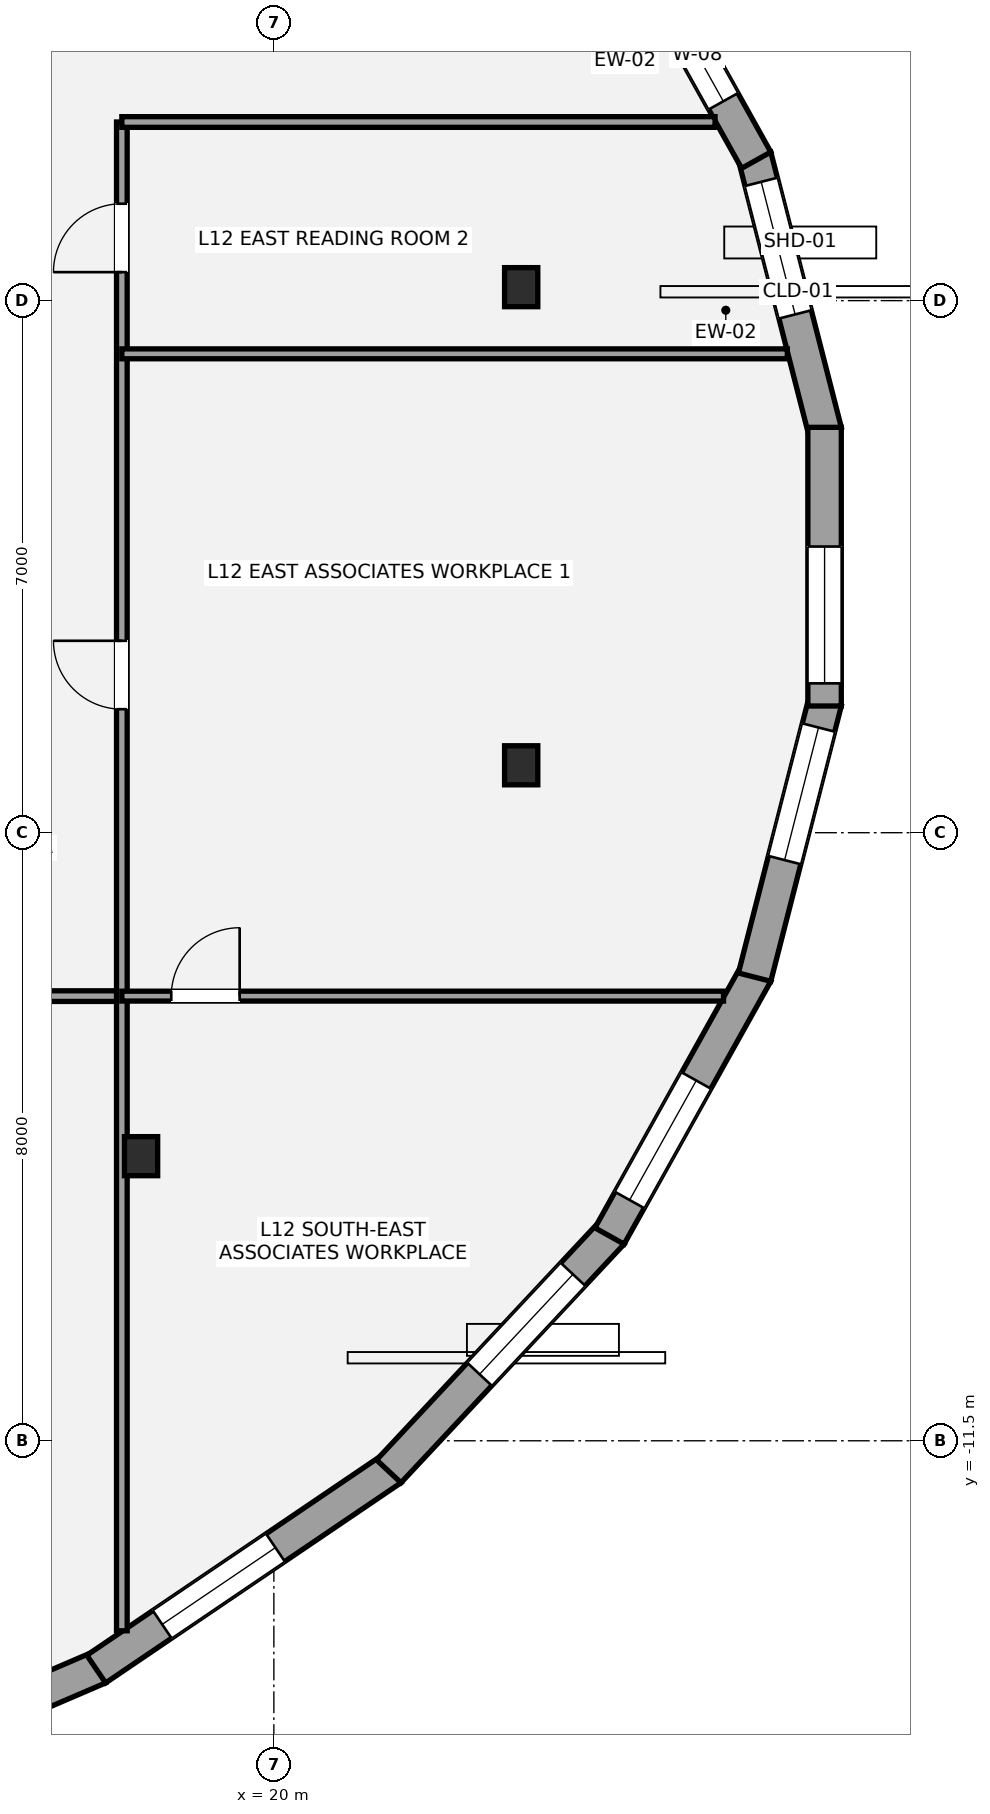
"""IFC4 building model, lengths in metres.
Left out: names, types, materials, properties, quantities, classifications, styles, units other than length and angle.
Written with IfcOpenShell. Run it as: python <this file> out.ifc"""

import sys

from ifc_helpers import new_model, si_unit, direction, frame, frame_2d, origin, origin_2d, place, context, subcontext, project, spatial, rectangle, i_section, extrude, element, fill, save


model = new_model("IFC4")
c1 = context("Model", 3, precision=1e-05, world=origin(), true_north=direction((0.0, 1.0)))
c2 = subcontext(c1, "Body", "Model", "MODEL_VIEW")
j1 = project(units=[si_unit("LENGTHUNIT", "METRE"), si_unit("PLANEANGLEUNIT", "RADIAN")], contexts=[c1])
p1 = place(None, origin())
s1 = spatial("IfcSite", under=j1, at=p1, CompositionType="ELEMENT")
p2 = place(p1, origin())
s2 = spatial("IfcBuilding", under=s1, at=p2, CompositionType="ELEMENT")
p3 = place(p2, frame((0.0, 0.0, 48.6)))
s3 = spatial("IfcBuildingStorey", under=s2, at=p3, CompositionType="ELEMENT", Elevation=48.6)
for number, where, z_axis, x_axis in (
    (1, (23.254, 3.677, 0.0), (0.0, 0.0, 1.0), (1.0, 0.0, 0.0)),
    (2, (18.253, -7.756, 0.0), (0.0, 0.0, 1.0), (1.0, 0.0, 0.0)),
    (3, (23.254, -2.613, 0.0), (0.0, 0.0, 1.0), (1.0, 0.0, 0.0)),
):
    element("IfcColumn", number, at=place(p3, frame(where, z_axis=z_axis, x_axis=x_axis)), inside=s3, PredefinedType="COLUMN", context=c2, shape_type="SweptSolid", body=[
        extrude(i_section(OverallWidth=0.437, OverallDepth=0.514, WebThickness=0.061, FlangeThickness=0.097, at=origin_2d()), origin(), (0.0, 0.0, 1.0), 3.6),
    ])
p4 = place(p3, frame((26.325, 5.4, 0.0), z_axis=(0.0, 0.0, 1.0), x_axis=(0.248062710061, -0.968743976434, 0.0)))
e4 = element("IfcWall", 4, at=p4, inside=s3, PredefinedType="STANDARD", context=c2, shape_type="SweptSolid", body=[
    extrude(rectangle(XDim=3.739, YDim=0.44, at=frame_2d((1.87, 0.0))), origin(), (0.0, 0.0, 1.0), 2.529),
])
p5 = place(p4, frame((0.349, 0.0, 0.65)))
e5 = element("IfcOpeningElement", 5, at=p5, cuts=e4, PredefinedType="OPENING", context=c2, shape_type="SweptSolid", body=[
    extrude(rectangle(XDim=1.8, YDim=1.7, at=frame_2d((0.9, 0.85))), frame((0.0, 0.23, 0.0), z_axis=(0.0, -1.0, 0.0), x_axis=(1.0, 0.0, 0.0)), (0.0, 0.0, 1.0), 0.46),
])
p6 = place(p3, frame((24.416, 8.806, 0.0), z_axis=(0.0, 0.0, 1.0), x_axis=(0.487369438963, -0.873195871477, 0.0)))
e6 = element("IfcWall", 6, at=p6, inside=s3, PredefinedType="STANDARD", context=c2, shape_type="SweptSolid", body=[
    extrude(rectangle(XDim=3.96, YDim=0.44, at=frame_2d((1.98, 0.0))), origin(), (0.0, 0.0, 1.0), 2.529),
])
p7 = place(p6, frame((1.673, 0.0, 0.58)))
e7 = element("IfcOpeningElement", 7, at=p7, cuts=e6, PredefinedType="OPENING", context=c2, shape_type="SweptSolid", body=[
    extrude(rectangle(XDim=1.4, YDim=1.55, at=frame_2d((0.7, 0.775))), frame((0.0, 0.23, 0.0), z_axis=(0.0, -1.0, 0.0), x_axis=(1.0, 0.0, 0.0)), (0.0, 0.0, 1.0), 0.46),
])
p8 = place(p3, frame((17.7, -14.483, 0.0), z_axis=(0.0, 0.0, 1.0), x_axis=(-0.918881850071, -0.394532819433, 0.0)))
e8 = element("IfcWall", 8, at=p8, inside=s3, PredefinedType="STANDARD", context=c2, shape_type="SweptSolid", body=[
    extrude(rectangle(XDim=5.042, YDim=0.44, at=frame_2d((2.521, 0.0))), origin(), (0.0, 0.0, 1.0), 2.529),
])
p9 = place(p8, frame((1.297, 0.0, 0.65)))
e9 = element("IfcOpeningElement", 9, at=p9, cuts=e8, PredefinedType="OPENING", context=c2, shape_type="SweptSolid", body=[
    extrude(rectangle(XDim=1.8, YDim=1.7, at=frame_2d((0.9, 0.85))), frame((0.0, 0.23, 0.0), z_axis=(0.0, -1.0, 0.0), x_axis=(1.0, 0.0, 0.0)), (0.0, 0.0, 1.0), 0.46),
])
p10 = place(p3, frame((21.549, -11.87, 0.0), z_axis=(0.0, 0.0, 1.0), x_axis=(-0.827825981515, -0.560984976919, 0.0)))
e10 = element("IfcWall", 10, at=p10, inside=s3, PredefinedType="STANDARD", context=c2, shape_type="SweptSolid", body=[
    extrude(rectangle(XDim=4.695, YDim=0.44, at=frame_2d((2.347, 0.0))), origin(), (0.0, 0.0, 1.0), 2.529),
])
p11 = place(p10, frame((1.846, 0.0, 0.65)))
e11 = element("IfcOpeningElement", 11, at=p11, cuts=e10, PredefinedType="OPENING", context=c2, shape_type="SweptSolid", body=[
    extrude(rectangle(XDim=1.8, YDim=1.7, at=frame_2d((0.9, 0.85))), frame((0.0, 0.23, 0.0), z_axis=(0.0, -1.0, 0.0), x_axis=(1.0, 0.0, 0.0)), (0.0, 0.0, 1.0), 0.46),
])
p12 = place(p3, frame((24.448, -8.763, 0.0), z_axis=(0.0, 0.0, 1.0), x_axis=(-0.68299392258, -0.730424056093, 0.0)))
e12 = element("IfcWall", 12, at=p12, inside=s3, PredefinedType="STANDARD", context=c2, shape_type="SweptSolid", body=[
    extrude(rectangle(XDim=4.298, YDim=0.44, at=frame_2d((2.149, 0.0))), origin(), (0.0, 0.0, 1.0), 2.529),
])
p13 = place(p12, frame((0.75, 0.0, 0.65)))
e13 = element("IfcOpeningElement", 13, at=p13, cuts=e12, PredefinedType="OPENING", context=c2, shape_type="SweptSolid", body=[
    extrude(rectangle(XDim=1.8, YDim=1.7, at=frame_2d((0.9, 0.85))), frame((0.0, 0.23, 0.0), z_axis=(0.0, -1.0, 0.0), x_axis=(1.0, 0.0, 0.0)), (0.0, 0.0, 1.0), 0.46),
])
p14 = place(p3, frame((26.346, -5.348, 0.0), z_axis=(0.0, 0.0, 1.0), x_axis=(-0.487369438963, -0.873195871477, 0.0)))
e14 = element("IfcWall", 14, at=p14, inside=s3, PredefinedType="STANDARD", context=c2, shape_type="SweptSolid", body=[
    extrude(rectangle(XDim=3.96, YDim=0.44, at=frame_2d((1.98, 0.0))), origin(), (0.0, 0.0, 1.0), 2.529),
])
p15 = place(p14, frame((1.618, 0.0, 0.65)))
e15 = element("IfcOpeningElement", 15, at=p15, cuts=e14, PredefinedType="OPENING", context=c2, shape_type="SweptSolid", body=[
    extrude(rectangle(XDim=1.8, YDim=1.7, at=frame_2d((0.9, 0.85))), frame((0.0, 0.23, 0.0), z_axis=(0.0, -1.0, 0.0), x_axis=(1.0, 0.0, 0.0)), (0.0, 0.0, 1.0), 0.46),
])
p16 = place(p3, frame((27.253, -1.778, 0.0), z_axis=(0.0, 0.0, 1.0), x_axis=(-0.248062710061, -0.968743976434, 0.0)))
e16 = element("IfcWall", 16, at=p16, inside=s3, PredefinedType="STANDARD", context=c2, shape_type="SweptSolid", body=[
    extrude(rectangle(XDim=3.739, YDim=0.44, at=frame_2d((1.87, 0.0))), origin(), (0.0, 0.0, 1.0), 2.529),
])
p17 = place(p16, frame((0.349, 0.0, 0.65)))
e17 = element("IfcOpeningElement", 17, at=p17, cuts=e16, PredefinedType="OPENING", context=c2, shape_type="SweptSolid", body=[
    extrude(rectangle(XDim=1.8, YDim=1.7, at=frame_2d((0.9, 0.85))), frame((0.0, 0.23, 0.0), z_axis=(0.0, -1.0, 0.0), x_axis=(1.0, 0.0, 0.0)), (0.0, 0.0, 1.0), 0.46),
])
p18 = place(p3, frame((27.246, 1.833, 0.0), z_axis=(0.0, 0.0, 1.0), x_axis=(0.0, -1.0, 0.0)))
e18 = element("IfcWall", 18, at=p18, inside=s3, PredefinedType="STANDARD", context=c2, shape_type="SweptSolid", body=[
    extrude(rectangle(XDim=3.666, YDim=0.44, at=frame_2d((1.833, 0.0))), origin(), (0.0, 0.0, 1.0), 2.529),
])
p19 = place(p18, frame((1.568, 0.0, 0.65)))
e19 = element("IfcOpeningElement", 19, at=p19, cuts=e18, PredefinedType="OPENING", context=c2, shape_type="SweptSolid", body=[
    extrude(rectangle(XDim=1.8, YDim=1.7, at=frame_2d((0.9, 0.85))), frame((0.0, 0.23, 0.0), z_axis=(0.0, -1.0, 0.0), x_axis=(1.0, 0.0, 0.0)), (0.0, 0.0, 1.0), 0.46),
])
p20 = place(p3, frame((-16.1, -5.65, 0.0), z_axis=(0.0, 0.0, 1.0), x_axis=(1.0, 0.0, 0.0)))
e20 = element("IfcWall", 20, at=p20, inside=s3, PredefinedType="PARTITIONING", context=c2, shape_type="SweptSolid", body=[
    extrude(rectangle(XDim=34.1, YDim=0.14, at=frame_2d((17.05, 0.0))), origin(), (0.0, 0.0, 1.0), 2.853),
])
p21 = place(p20, frame((5.35, 0.0, 0.0)))
e21 = element("IfcOpeningElement", 21, at=p21, cuts=e20, PredefinedType="OPENING", context=c2, shape_type="SweptSolid", body=[
    extrude(rectangle(XDim=0.9, YDim=2.1, at=frame_2d((0.45, 1.05))), frame((0.0, 0.08, 0.0), z_axis=(0.0, -1.0, 0.0), x_axis=(1.0, 0.0, 0.0)), (0.0, 0.0, 1.0), 0.16),
])
p22 = place(p20, frame((15.85, 0.0, 0.0)))
e22 = element("IfcOpeningElement", 22, at=p22, cuts=e20, PredefinedType="OPENING", context=c2, shape_type="SweptSolid", body=[
    extrude(rectangle(XDim=1.5, YDim=2.15, at=frame_2d((0.75, 1.075))), frame((0.0, 0.08, 0.0), z_axis=(0.0, -1.0, 0.0), x_axis=(1.0, 0.0, 0.0)), (0.0, 0.0, 1.0), 0.16),
])
p23 = place(p20, frame((27.4, 0.0, 0.0)))
e23 = element("IfcOpeningElement", 23, at=p23, cuts=e20, PredefinedType="OPENING", context=c2, shape_type="SweptSolid", body=[
    extrude(rectangle(XDim=0.9, YDim=2.1, at=frame_2d((0.45, 1.05))), frame((0.0, 0.08, 0.0), z_axis=(0.0, -1.0, 0.0), x_axis=(1.0, 0.0, 0.0)), (0.0, 0.0, 1.0), 0.16),
])
p24 = place(p3, frame((18.0, -14.0, 0.0), z_axis=(0.0, 0.0, 1.0), x_axis=(0.0, 1.0, 0.0)))
e24 = element("IfcWall", 24, at=p24, inside=s3, PredefinedType="PARTITIONING", context=c2, shape_type="SweptSolid", body=[
    extrude(rectangle(XDim=19.85, YDim=0.14, at=frame_2d((9.925, 0.0))), origin(), (0.0, 0.0, 1.0), 2.841),
])
p25 = place(p24, frame((12.125, 0.0, 0.0)))
e25 = element("IfcOpeningElement", 25, at=p25, cuts=e24, PredefinedType="OPENING", context=c2, shape_type="SweptSolid", body=[
    extrude(rectangle(XDim=0.9, YDim=2.1, at=frame_2d((0.45, 1.05))), frame((0.0, 0.08, 0.0), z_axis=(0.0, -1.0, 0.0), x_axis=(1.0, 0.0, 0.0)), (0.0, 0.0, 1.0), 0.16),
])
p26 = place(p24, frame((17.875, 0.0, 0.0)))
e26 = element("IfcOpeningElement", 26, at=p26, cuts=e24, PredefinedType="OPENING", context=c2, shape_type="SweptSolid", body=[
    extrude(rectangle(XDim=0.9, YDim=2.1, at=frame_2d((0.45, 1.05))), frame((0.0, 0.08, 0.0), z_axis=(0.0, -1.0, 0.0), x_axis=(1.0, 0.0, 0.0)), (0.0, 0.0, 1.0), 0.16),
])
p27 = place(p3, frame((18.0, 5.85, 0.0), z_axis=(0.0, 0.0, 1.0), x_axis=(1.0, 0.0, 0.0)))
e27 = element("IfcWall", 27, at=p27, inside=s3, PredefinedType="PARTITIONING", context=c2, shape_type="SweptSolid", body=[
    extrude(rectangle(XDim=7.805, YDim=0.14, at=frame_2d((3.902, 0.0))), origin(), (0.0, 0.0, 1.0), 3.4),
])
p28 = place(p3, frame((18.0, -5.65, 0.0), z_axis=(0.0, 0.0, 1.0), x_axis=(1.0, 0.0, 0.0)))
e28 = element("IfcWall", 28, at=p28, inside=s3, PredefinedType="PARTITIONING", context=c2, shape_type="SweptSolid", body=[
    extrude(rectangle(XDim=7.917, YDim=0.13, at=frame_2d((3.958, 0.0))), origin(), (0.0, 0.0, 1.0), 2.779),
])
p29 = place(p28, frame((0.65, 0.0, 0.0)))
e29 = element("IfcOpeningElement", 29, at=p29, cuts=e28, PredefinedType="OPENING", context=c2, shape_type="SweptSolid", body=[
    extrude(rectangle(XDim=0.9, YDim=2.1, at=frame_2d((0.45, 1.05))), frame((0.0, 0.075, 0.0), z_axis=(0.0, -1.0, 0.0), x_axis=(1.0, 0.0, 0.0)), (0.0, 0.0, 1.0), 0.15),
])
p30 = place(p3, frame((18.0, 2.8, 0.0), z_axis=(0.0, 0.0, 1.0), x_axis=(1.0, 0.0, 0.0)))
e30 = element("IfcWall", 30, at=p30, inside=s3, PredefinedType="PARTITIONING", context=c2, shape_type="SweptSolid", body=[
    extrude(rectangle(XDim=8.756, YDim=0.13, at=frame_2d((4.378, 0.0))), origin(), (0.0, 0.0, 1.0), 2.841),
])
p31 = place(p5, origin())
e31 = element("IfcWindow", 31, at=p31, inside=s3, PartitioningType="SINGLE_PANEL", PredefinedType="WINDOW", context=c2, shape_type="SweptSolid", body=[
    extrude(rectangle(XDim=1.8, YDim=1.7, at=frame_2d((0.9, 0.85))), frame((0.0, -0.01, 0.0), z_axis=(0.0, -1.0, 0.0), x_axis=(1.0, 0.0, 0.0)), (0.0, 0.0, 1.0), 0.06),
])
fill(e5, e31)
p32 = place(p7, origin())
e32 = element("IfcWindow", 32, at=p32, inside=s3, PartitioningType="SINGLE_PANEL", PredefinedType="WINDOW", context=c2, shape_type="SweptSolid", body=[
    extrude(rectangle(XDim=1.4, YDim=1.55, at=frame_2d((0.7, 0.775))), frame((0.0, -0.01, 0.0), z_axis=(0.0, -1.0, 0.0), x_axis=(1.0, 0.0, 0.0)), (0.0, 0.0, 1.0), 0.06),
])
fill(e7, e32)
p33 = place(p11, origin())
e33 = element("IfcWindow", 33, at=p33, inside=s3, PartitioningType="SINGLE_PANEL", PredefinedType="WINDOW", context=c2, shape_type="SweptSolid", body=[
    extrude(rectangle(XDim=1.8, YDim=1.7, at=frame_2d((0.9, 0.85))), frame((0.0, -0.01, 0.0), z_axis=(0.0, -1.0, 0.0), x_axis=(1.0, 0.0, 0.0)), (0.0, 0.0, 1.0), 0.06),
])
fill(e11, e33)
p34 = place(p13, origin())
e34 = element("IfcWindow", 34, at=p34, inside=s3, PartitioningType="SINGLE_PANEL", PredefinedType="WINDOW", context=c2, shape_type="SweptSolid", body=[
    extrude(rectangle(XDim=1.8, YDim=1.7, at=frame_2d((0.9, 0.85))), frame((0.0, -0.01, 0.0), z_axis=(0.0, -1.0, 0.0), x_axis=(1.0, 0.0, 0.0)), (0.0, 0.0, 1.0), 0.06),
])
fill(e13, e34)
p35 = place(p15, origin())
e35 = element("IfcWindow", 35, at=p35, inside=s3, PartitioningType="SINGLE_PANEL", PredefinedType="WINDOW", context=c2, shape_type="SweptSolid", body=[
    extrude(rectangle(XDim=1.8, YDim=1.7, at=frame_2d((0.9, 0.85))), frame((0.0, -0.01, 0.0), z_axis=(0.0, -1.0, 0.0), x_axis=(1.0, 0.0, 0.0)), (0.0, 0.0, 1.0), 0.06),
])
fill(e15, e35)
p36 = place(p17, origin())
e36 = element("IfcWindow", 36, at=p36, inside=s3, PartitioningType="SINGLE_PANEL", PredefinedType="WINDOW", context=c2, shape_type="SweptSolid", body=[
    extrude(rectangle(XDim=1.8, YDim=1.7, at=frame_2d((0.9, 0.85))), frame((0.0, -0.01, 0.0), z_axis=(0.0, -1.0, 0.0), x_axis=(1.0, 0.0, 0.0)), (0.0, 0.0, 1.0), 0.06),
])
fill(e17, e36)
p37 = place(p19, origin())
e37 = element("IfcWindow", 37, at=p37, inside=s3, PartitioningType="SINGLE_PANEL", PredefinedType="WINDOW", context=c2, shape_type="SweptSolid", body=[
    extrude(rectangle(XDim=1.8, YDim=1.7, at=frame_2d((0.9, 0.85))), frame((0.0, -0.01, 0.0), z_axis=(0.0, -1.0, 0.0), x_axis=(1.0, 0.0, 0.0)), (0.0, 0.0, 1.0), 0.06),
])
fill(e19, e37)
p38 = place(p29, origin())
e38 = element("IfcDoor", 38, at=p38, inside=s3, OperationType="SINGLE_SWING_RIGHT", PredefinedType="DOOR", context=c2, shape_type="SweptSolid", body=[
    extrude(rectangle(XDim=0.9, YDim=2.1, at=frame_2d((0.45, 1.05))), frame((0.0, 0.025, 0.0), z_axis=(0.0, -1.0, 0.0), x_axis=(1.0, 0.0, 0.0)), (0.0, 0.0, 1.0), 0.05),
])
fill(e29, e38)
p39 = place(p25, origin())
e39 = element("IfcDoor", 39, at=p39, inside=s3, OperationType="SINGLE_SWING_RIGHT", PredefinedType="DOOR", context=c2, shape_type="SweptSolid", body=[
    extrude(rectangle(XDim=0.9, YDim=2.1, at=frame_2d((0.45, 1.05))), frame((0.0, 0.025, 0.0), z_axis=(0.0, -1.0, 0.0), x_axis=(1.0, 0.0, 0.0)), (0.0, 0.0, 1.0), 0.05),
])
fill(e25, e39)
p40 = place(p26, origin())
e40 = element("IfcDoor", 40, at=p40, inside=s3, OperationType="SINGLE_SWING_LEFT", PredefinedType="DOOR", context=c2, shape_type="SweptSolid", body=[
    extrude(rectangle(XDim=0.9, YDim=2.1, at=frame_2d((0.45, 1.05))), frame((0.0, 0.025, 0.0), z_axis=(0.0, -1.0, 0.0), x_axis=(1.0, 0.0, 0.0)), (0.0, 0.0, 1.0), 0.05),
])
fill(e26, e40)
save(model, sys.argv[1])
